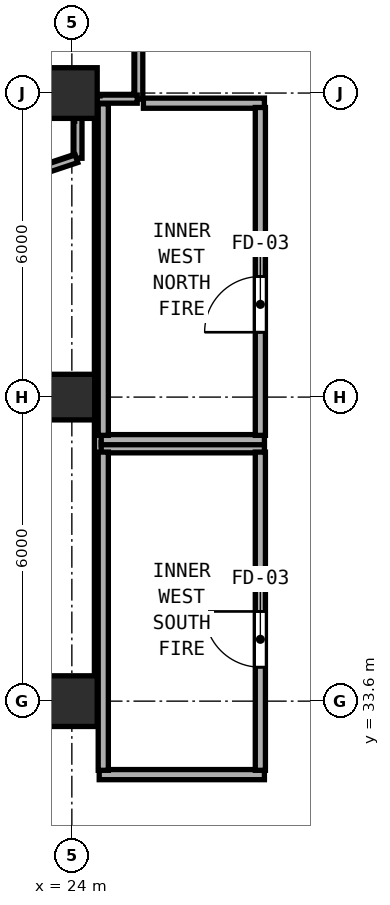
"""IFC4 building model, lengths in metres.
Left out: names, types, materials, properties, quantities, classifications, styles, units other than length and angle.
Written with IfcOpenShell. Run it as: python <this file> out.ifc"""

import sys

from ifc_helpers import new_model, si_unit, direction, frame, frame_2d, origin, origin_2d, place, context, subcontext, project, spatial, rectangle, hollow_rectangle, extrude, element, fill, save


model = new_model("IFC4")
c1 = context("Model", 3, precision=1e-05, world=origin(), true_north=direction((0.0, 1.0)))
c2 = subcontext(c1, "Body", "Model", "MODEL_VIEW")
j1 = project(units=[si_unit("LENGTHUNIT", "METRE"), si_unit("PLANEANGLEUNIT", "RADIAN")], contexts=[c1])
p1 = place(None, origin())
s1 = spatial("IfcSite", under=j1, at=p1, CompositionType="ELEMENT")
p2 = place(p1, origin())
s2 = spatial("IfcBuilding", under=s1, at=p2, CompositionType="ELEMENT")
p3 = place(p2, frame((0.0, 0.0, 160.0)))
s3 = spatial("IfcBuildingStorey", under=s2, at=p3, CompositionType="ELEMENT", Elevation=160.0)
for number, where, z_axis, x_axis in (
    (1, (24.0, 33.6, 0.0), (0.0, 0.0, 1.0), (1.0, 0.0, 0.0)),
    (2, (24.0, 45.6, 0.0), (0.0, 0.0, 1.0), (1.0, 0.0, 0.0)),
):
    element("IfcColumn", number, at=place(p3, frame(where, z_axis=z_axis, x_axis=x_axis)), inside=s3, PredefinedType="COLUMN", context=c2, shape_type="SweptSolid", body=[
        extrude(hollow_rectangle(XDim=1.0, YDim=1.0, WallThickness=0.038, at=origin_2d()), origin(), (0.0, 0.0, 1.0), 4.6),
    ])
p4 = place(p3, frame((24.0, 39.6, 0.0), z_axis=(0.0, 0.0, 1.0), x_axis=(1.0, 0.0, 0.0)))
e3 = element("IfcColumn", 3, at=p4, inside=s3, PredefinedType="COLUMN", context=c2, shape_type="SweptSolid", body=[
    extrude(hollow_rectangle(XDim=0.9, YDim=0.9, WallThickness=0.034, at=origin_2d()), origin(), (0.0, 0.0, 1.0), 4.6),
])
p5 = place(p3, frame((25.32, 46.65, 0.0), z_axis=(0.0, 0.0, 1.0), x_axis=(0.0, -1.0, 0.0)))
e4 = element("IfcWall", 4, at=p5, inside=s3, PredefinedType="PARAPET", context=c2, shape_type="SweptSolid", body=[
    extrude(rectangle(XDim=1.17, YDim=0.16, at=frame_2d((0.585, 0.0))), origin(), (0.0, 0.0, 1.0), 1.15),
])
p6 = place(p3, frame((25.29, 45.48, 0.0), z_axis=(0.0, 0.0, 1.0), x_axis=(-1.0, 0.0, 0.0)))
e5 = element("IfcWall", 5, at=p6, inside=s3, PredefinedType="PARAPET", context=c2, shape_type="SweptSolid", body=[
    extrude(rectangle(XDim=0.798, YDim=0.16, at=frame_2d((0.399, 0.0))), origin(), (0.0, 0.0, 1.0), 1.15),
])
p7 = place(p3, frame((24.12, 45.108, 0.0), z_axis=(0.0, 0.0, 1.0), x_axis=(0.0, -1.0, 0.0)))
e6 = element("IfcWall", 6, at=p7, inside=s3, PredefinedType="PARAPET", context=c2, shape_type="SweptSolid", body=[
    extrude(rectangle(XDim=0.794, YDim=0.16, at=frame_2d((0.397, 0.0))), origin(), (0.0, 0.0, 1.0), 1.15),
])
p8 = place(p3, frame((24.092, 44.304, 0.0), z_axis=(0.0, 0.0, 1.0), x_axis=(-0.948683298051, -0.316227766017, 0.0)))
e7 = element("IfcWall", 7, at=p8, inside=s3, PredefinedType="PARAPET", context=c2, shape_type="SweptSolid", body=[
    extrude(rectangle(XDim=5.888, YDim=0.16, at=frame_2d((2.944, 0.0))), origin(), (0.0, 0.0, 1.0), 1.15),
])
p9 = place(p3, frame((24.52, 33.6, 0.0), z_axis=(0.0, 0.0, 1.0), x_axis=(0.0, 1.0, 0.0)))
e8 = element("IfcWall", 8, at=p9, inside=s3, PredefinedType="PARTITIONING", context=c2, shape_type="SweptSolid", body=[
    extrude(rectangle(XDim=11.788, YDim=0.15, at=frame_2d((5.894, 0.0))), origin(), (0.0, 0.0, 1.0), 4.35),
])
p10 = place(p3, frame((24.58, 38.6, 0.0), z_axis=(0.0, 0.0, 1.0), x_axis=(1.0, 0.0, 0.0)))
e9 = element("IfcWall", 9, at=p10, inside=s3, PredefinedType="SOLIDWALL", context=c2, shape_type="SweptSolid", body=[
    extrude(rectangle(XDim=3.22, YDim=0.2, at=frame_2d((1.61, 0.0))), origin(), (0.0, 0.0, 1.0), 4.35),
])
p11 = place(p3, frame((24.54, 32.15, 0.0), z_axis=(0.0, 0.0, 1.0), x_axis=(1.0, 0.0, 0.0)))
e10 = element("IfcWall", 10, at=p11, inside=s3, PredefinedType="SOLIDWALL", context=c2, shape_type="SweptSolid", body=[
    extrude(rectangle(XDim=3.26, YDim=0.2, at=frame_2d((1.63, 0.0))), origin(), (0.0, 0.0, 1.0), 4.35),
])
p12 = place(p3, frame((24.62, 32.235, 0.0), z_axis=(0.0, 0.0, 1.0), x_axis=(0.0, 1.0, 0.0)))
e11 = element("IfcWall", 11, at=p12, inside=s3, PredefinedType="SOLIDWALL", context=c2, shape_type="SweptSolid", body=[
    extrude(rectangle(XDim=6.28, YDim=0.2, at=frame_2d((3.14, 0.0))), origin(), (0.0, 0.0, 1.0), 4.35),
])
p13 = place(p3, frame((27.72, 32.235, 0.0), z_axis=(0.0, 0.0, 1.0), x_axis=(0.0, 1.0, 0.0)))
e12 = element("IfcWall", 12, at=p13, inside=s3, PredefinedType="SOLIDWALL", context=c2, shape_type="SweptSolid", body=[
    extrude(rectangle(XDim=6.28, YDim=0.2, at=frame_2d((3.14, 0.0))), origin(), (0.0, 0.0, 1.0), 4.35),
])
p14 = place(p13, frame((3.135, 0.0, 0.0), z_axis=(0.0, 0.0, 1.0), x_axis=(-1.0, 0.0, 0.0)))
e13 = element("IfcOpeningElement", 13, at=p14, cuts=e12, PredefinedType="OPENING", context=c2, shape_type="SweptSolid", body=[
    extrude(rectangle(XDim=1.1, YDim=2.15, at=frame_2d((0.55, 1.075))), frame((0.0, 0.11, 0.0), z_axis=(0.0, -1.0, 0.0), x_axis=(1.0, 0.0, 0.0)), (0.0, 0.0, 1.0), 0.22),
])
p15 = place(p3, frame((25.412, 45.4, 0.0), z_axis=(0.0, 0.0, 1.0), x_axis=(1.0, 0.0, 0.0)))
e14 = element("IfcWall", 14, at=p15, inside=s3, PredefinedType="SOLIDWALL", context=c2, shape_type="SweptSolid", body=[
    extrude(rectangle(XDim=2.388, YDim=0.2, at=frame_2d((1.194, 0.0))), origin(), (0.0, 0.0, 1.0), 4.35),
])
p16 = place(p3, frame((24.58, 38.76, 0.0), z_axis=(0.0, 0.0, 1.0), x_axis=(1.0, 0.0, 0.0)))
e15 = element("IfcWall", 15, at=p16, inside=s3, PredefinedType="SOLIDWALL", context=c2, shape_type="SweptSolid", body=[
    extrude(rectangle(XDim=3.22, YDim=0.2, at=frame_2d((1.61, 0.0))), origin(), (0.0, 0.0, 1.0), 4.35),
])
p17 = place(p3, frame((24.62, 38.845, 0.0), z_axis=(0.0, 0.0, 1.0), x_axis=(0.0, 1.0, 0.0)))
e16 = element("IfcWall", 16, at=p17, inside=s3, PredefinedType="SOLIDWALL", context=c2, shape_type="SweptSolid", body=[
    extrude(rectangle(XDim=6.543, YDim=0.2, at=frame_2d((3.271, 0.0))), origin(), (0.0, 0.0, 1.0), 4.35),
])
p18 = place(p3, frame((27.72, 38.845, 0.0), z_axis=(0.0, 0.0, 1.0), x_axis=(0.0, 1.0, 0.0)))
e17 = element("IfcWall", 17, at=p18, inside=s3, PredefinedType="SOLIDWALL", context=c2, shape_type="SweptSolid", body=[
    extrude(rectangle(XDim=6.47, YDim=0.2, at=frame_2d((3.235, 0.0))), origin(), (0.0, 0.0, 1.0), 4.35),
])
p19 = place(p18, frame((3.135, 0.0, 0.0), z_axis=(0.0, 0.0, 1.0), x_axis=(-1.0, 0.0, 0.0)))
e18 = element("IfcOpeningElement", 18, at=p19, cuts=e17, PredefinedType="OPENING", context=c2, shape_type="SweptSolid", body=[
    extrude(rectangle(XDim=1.1, YDim=2.15, at=frame_2d((0.55, 1.075))), frame((0.0, 0.11, 0.0), z_axis=(0.0, -1.0, 0.0), x_axis=(1.0, 0.0, 0.0)), (0.0, 0.0, 1.0), 0.22),
])
p20 = place(p14, origin())
e19 = element("IfcDoor", 19, at=p20, inside=s3, OperationType="SINGLE_SWING_LEFT", PredefinedType="DOOR", context=c2, shape_type="SweptSolid", body=[
    extrude(rectangle(XDim=1.1, YDim=2.15, at=frame_2d((0.55, 1.075))), frame((0.0, 0.025, 0.0), z_axis=(0.0, -1.0, 0.0), x_axis=(1.0, 0.0, 0.0)), (0.0, 0.0, 1.0), 0.05),
])
fill(e13, e19)
p21 = place(p19, origin())
e20 = element("IfcDoor", 20, at=p21, inside=s3, OperationType="SINGLE_SWING_RIGHT", PredefinedType="DOOR", context=c2, shape_type="SweptSolid", body=[
    extrude(rectangle(XDim=1.1, YDim=2.15, at=frame_2d((0.55, 1.075))), frame((0.0, 0.025, 0.0), z_axis=(0.0, -1.0, 0.0), x_axis=(1.0, 0.0, 0.0)), (0.0, 0.0, 1.0), 0.05),
])
fill(e18, e20)
save(model, sys.argv[1])
